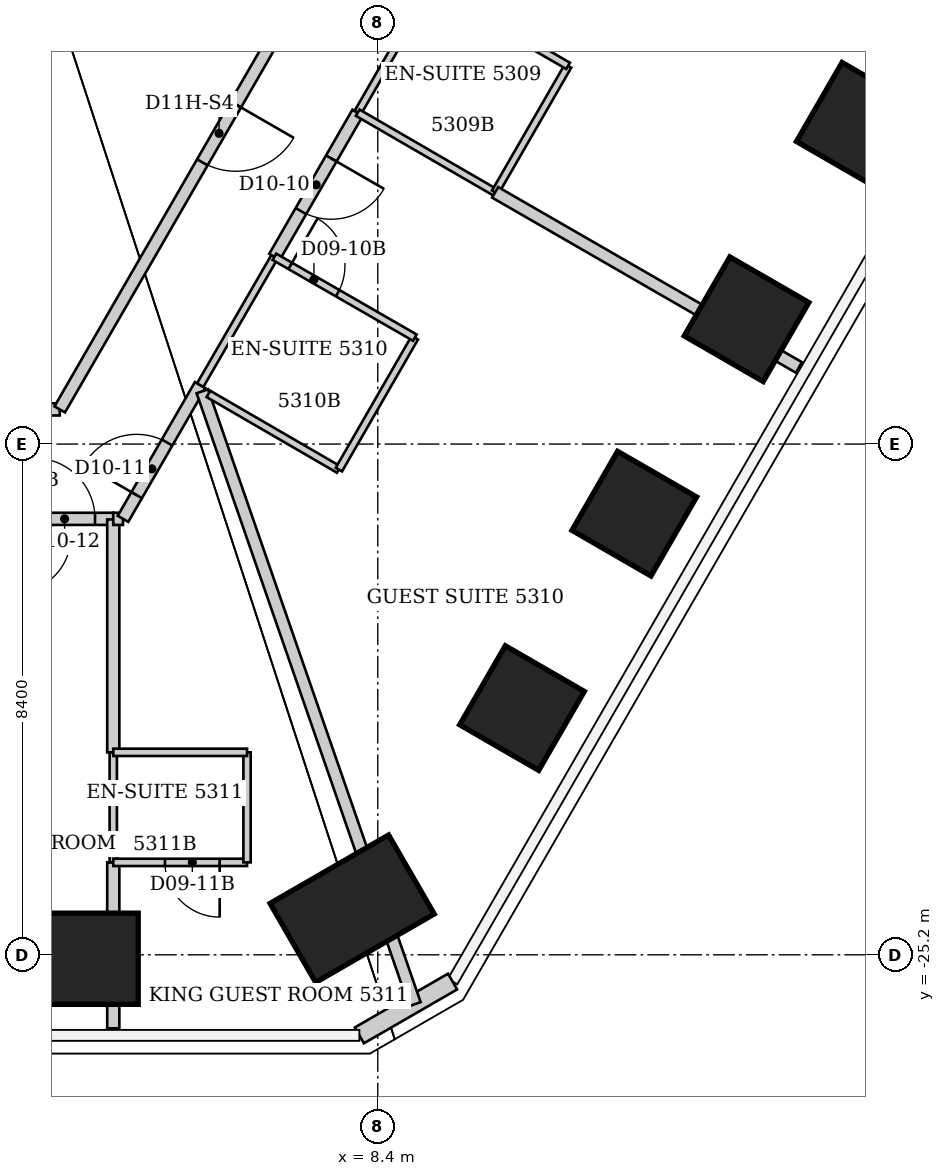
"""IFC4 building model, lengths in metres.
Left out: names, types, materials, properties, quantities, classifications, styles, units other than length and angle.
Written with IfcOpenShell. Run it as: python <this file> out.ifc"""

import sys

from ifc_helpers import new_model, si_unit, direction, frame, frame_2d, origin, origin_2d, place, context, subcontext, project, spatial, rectangle, extrude, element, fill, save


model = new_model("IFC4")
c1 = context("Model", 3, precision=1e-05, world=origin(), true_north=direction((0.0, 1.0)))
c2 = subcontext(c1, "Body", "Model", "MODEL_VIEW")
j1 = project(units=[si_unit("LENGTHUNIT", "METRE"), si_unit("PLANEANGLEUNIT", "RADIAN")], contexts=[c1])
p1 = place(None, origin())
s1 = spatial("IfcSite", under=j1, at=p1, CompositionType="ELEMENT")
p2 = place(p1, origin())
s2 = spatial("IfcBuilding", under=s1, at=p2, CompositionType="ELEMENT")
p3 = place(p2, frame((0.0, 0.0, 213.6)))
s3 = spatial("IfcBuildingStorey", under=s2, at=p3, CompositionType="ELEMENT", Elevation=213.6)
for number, where, z_axis, x_axis in (
    (1, (16.311, -11.549, 0.0), (0.0, 0.0, 1.0), (0.866, -0.5, 0.0)),
    (2, (14.465, -14.747, 0.0), (0.0, 0.0, 1.0), (0.866, -0.5, 0.0)),
    (3, (12.618, -17.945, 0.0), (0.0, 0.0, 1.0), (0.866, -0.5, 0.0)),
    (4, (10.772, -21.142, 0.0), (0.0, 0.0, 1.0), (0.866, -0.5, 0.0)),
):
    element("IfcColumn", number, at=place(p3, frame(where, z_axis=z_axis, x_axis=x_axis)), inside=s3, PredefinedType="COLUMN", context=c2, shape_type="SweptSolid", body=[
        extrude(rectangle(XDim=1.5, YDim=1.5, at=origin_2d()), origin(), (0.0, 0.0, 1.0), 3.8),
    ])
p4 = place(p3, frame((7.979, -24.442, 0.0), z_axis=(0.0, 0.0, 1.0), x_axis=(0.5, -0.866025403784, 0.0)))
e5 = element("IfcColumn", 5, at=p4, inside=s3, PredefinedType="COLUMN", context=c2, shape_type="SweptSolid", body=[
    extrude(rectangle(XDim=1.5, YDim=2.25, at=origin_2d()), origin(), (0.0, 0.0, 1.0), 3.8),
])
p5 = place(p3, frame((3.71, -25.265, 0.0), z_axis=(0.0, 0.0, 1.0), x_axis=(0.0, -1.0, 0.0)))
e6 = element("IfcColumn", 6, at=p5, inside=s3, PredefinedType="COLUMN", context=c2, shape_type="SweptSolid", body=[
    extrude(rectangle(XDim=1.5, YDim=1.5, at=origin_2d()), origin(), (0.0, 0.0, 1.0), 3.8),
])
p6 = place(p3, frame((9.63, -25.64, 0.0), z_axis=(0.0, 0.0, 1.0), x_axis=(-0.866036293601, -0.499981137809, 0.0)))
e7 = element("IfcWall", 7, at=p6, inside=s3, PredefinedType="SOLIDWALL", context=c2, shape_type="SweptSolid", body=[
    extrude(rectangle(XDim=1.77, YDim=0.3, at=frame_2d((0.885, 0.0))), origin(), (0.0, 0.0, 1.0), 3.64),
])
p7 = place(p3, frame((2.45, -18.03, 0.0), z_axis=(0.0, 0.0, 1.0), x_axis=(1.0, 0.0, 0.0)))
e8 = element("IfcWall", 8, at=p7, inside=s3, PredefinedType="PARTITIONING", context=c2, shape_type="SweptSolid", body=[
    extrude(rectangle(XDim=1.6, YDim=0.2, at=frame_2d((0.8, 0.0))), origin(), (0.0, 0.0, 1.0), 3.64),
])
p8 = place(p7, frame((0.3, 0.0, 0.0)))
e9 = element("IfcOpeningElement", 9, at=p8, cuts=e8, PredefinedType="OPENING", context=c2, shape_type="SweptSolid", body=[
    extrude(rectangle(XDim=1.0, YDim=2.13, at=frame_2d((0.5, 1.065))), frame((0.0, 0.1, 0.0), z_axis=(0.0, -1.0, 0.0), x_axis=(1.0, 0.0, 0.0)), (0.0, 0.0, 1.0), 0.2),
])
p9 = place(p3, frame((3.17, -16.23, 0.0), z_axis=(0.0, 0.0, 1.0), x_axis=(-1.0, 0.0, 0.0)))
e10 = element("IfcWall", 10, at=p9, inside=s3, PredefinedType="PARTITIONING", context=c2, shape_type="SweptSolid", body=[
    extrude(rectangle(XDim=1.57, YDim=0.2, at=frame_2d((0.785, 0.0))), origin(), (0.0, 0.0, 1.0), 3.64),
])
p10 = place(p3, frame((4.05, -26.41, 0.0), z_axis=(0.0, 0.0, 1.0), x_axis=(0.0, 1.0, 0.0)))
e11 = element("IfcWall", 11, at=p10, inside=s3, PredefinedType="PARTITIONING", context=c2, shape_type="SweptSolid", body=[
    extrude(rectangle(XDim=2.73, YDim=0.2, at=frame_2d((1.365, 0.0))), origin(), (0.0, 0.0, 1.0), 3.64),
])
p11 = place(p3, frame((4.05, -23.68, 0.0), z_axis=(0.0, 0.0, 1.0), x_axis=(0.0, 1.0, 0.0)))
e12 = element("IfcWall", 12, at=p11, inside=s3, PredefinedType="PARTITIONING", context=c2, shape_type="SweptSolid", body=[
    extrude(rectangle(XDim=1.81, YDim=0.12, at=frame_2d((0.905, 0.0))), origin(), (0.0, 0.0, 1.0), 3.64),
])
p12 = place(p3, frame((4.05, -23.68, 0.0), z_axis=(0.0, 0.0, 1.0), x_axis=(1.0, 0.0, 0.0)))
e13 = element("IfcWall", 13, at=p12, inside=s3, PredefinedType="PARTITIONING", context=c2, shape_type="SweptSolid", body=[
    extrude(rectangle(XDim=2.2, YDim=0.12, at=frame_2d((1.1, 0.0))), origin(), (0.0, 0.0, 1.0), 3.64),
])
p13 = place(p12, frame((0.85, 0.0, 0.0)))
e14 = element("IfcOpeningElement", 14, at=p13, cuts=e13, PredefinedType="OPENING", context=c2, shape_type="SweptSolid", body=[
    extrude(rectangle(XDim=0.9, YDim=2.03, at=frame_2d((0.45, 1.015))), frame((0.0, 0.06, 0.0), z_axis=(0.0, -1.0, 0.0), x_axis=(1.0, 0.0, 0.0)), (0.0, 0.0, 1.0), 0.12),
])
p14 = place(p3, frame((4.05, -21.87, 0.0), z_axis=(0.0, 0.0, 1.0), x_axis=(0.0, 1.0, 0.0)))
e15 = element("IfcWall", 15, at=p14, inside=s3, PredefinedType="PARTITIONING", context=c2, shape_type="SweptSolid", body=[
    extrude(rectangle(XDim=3.83, YDim=0.2, at=frame_2d((1.915, 0.0))), origin(), (0.0, 0.0, 1.0), 3.64),
])
p15 = place(p3, frame((4.05, -18.03, 0.0), z_axis=(0.0, 0.0, 1.0), x_axis=(1.0, 0.0, 0.0)))
e16 = element("IfcWall", 16, at=p15, inside=s3, PredefinedType="PARTITIONING", context=c2, shape_type="SweptSolid", body=[
    extrude(rectangle(XDim=0.16, YDim=0.2, at=frame_2d((0.08, 0.0))), origin(), (0.0, 0.0, 1.0), 3.64),
])
p16 = place(p3, frame((4.21, -18.03, 0.0), z_axis=(0.0, 0.0, 1.0), x_axis=(0.499963722229, 0.866046347752, 0.0)))
e17 = element("IfcWall", 17, at=p16, inside=s3, PredefinedType="PARTITIONING", context=c2, shape_type="SweptSolid", body=[
    extrude(rectangle(XDim=2.54, YDim=0.2, at=frame_2d((1.27, 0.0))), origin(), (0.0, 0.0, 1.0), 3.64),
])
p17 = place(p16, frame((0.45, 0.0, 0.0)))
e18 = element("IfcOpeningElement", 18, at=p17, cuts=e17, PredefinedType="OPENING", context=c2, shape_type="SweptSolid", body=[
    extrude(rectangle(XDim=1.0, YDim=2.13, at=frame_2d((0.5, 1.065))), frame((0.0, 0.1, 0.0), z_axis=(0.0, -1.0, 0.0), x_axis=(1.0, 0.0, 0.0)), (0.0, 0.0, 1.0), 0.2),
])
p18 = place(p3, frame((5.48, -15.83, 0.0), z_axis=(0.0, 0.0, 1.0), x_axis=(0.50122183301, 0.865318828013, 0.0)))
e19 = element("IfcWall", 19, at=p18, inside=s3, PredefinedType="PARTITIONING", context=c2, shape_type="SweptSolid", body=[
    extrude(rectangle(XDim=2.438, YDim=0.12, at=frame_2d((1.219, 0.0))), origin(), (0.0, 0.0, 1.0), 3.64),
])
p19 = place(p3, frame((5.515, -15.932, 0.0), z_axis=(0.0, 0.0, 1.0), x_axis=(0.327594697431, -0.944818349851, 0.0)))
e20 = element("IfcWall", 20, at=p19, inside=s3, PredefinedType="PARTITIONING", context=c2, shape_type="SweptSolid", body=[
    extrude(rectangle(XDim=10.668, YDim=0.2, at=frame_2d((5.334, 0.0))), origin(), (0.0, 0.0, 1.0), 3.64),
])
p20 = place(p3, frame((5.615, -15.975, 0.0), z_axis=(0.0, 0.0, 1.0), x_axis=(0.864873056518, -0.501990633487, 0.0)))
e21 = element("IfcWall", 21, at=p20, inside=s3, PredefinedType="PARTITIONING", context=c2, shape_type="SweptSolid", body=[
    extrude(rectangle(XDim=2.48, YDim=0.12, at=frame_2d((1.24, 0.0))), origin(), (0.0, 0.0, 1.0), 3.038),
])
p21 = place(p3, frame((6.25, -23.68, 0.0), z_axis=(0.0, 0.0, 1.0), x_axis=(0.0, 1.0, 0.0)))
e22 = element("IfcWall", 22, at=p21, inside=s3, PredefinedType="PARTITIONING", context=c2, shape_type="SweptSolid", body=[
    extrude(rectangle(XDim=1.81, YDim=0.12, at=frame_2d((0.905, 0.0))), origin(), (0.0, 0.0, 1.0), 3.64),
])
p22 = place(p3, frame((6.25, -21.87, 0.0), z_axis=(0.0, 0.0, 1.0), x_axis=(-1.0, 0.0, 0.0)))
e23 = element("IfcWall", 23, at=p22, inside=s3, PredefinedType="PARTITIONING", context=c2, shape_type="SweptSolid", body=[
    extrude(rectangle(XDim=2.2, YDim=0.12, at=frame_2d((1.1, 0.0))), origin(), (0.0, 0.0, 1.0), 3.64),
])
p23 = place(p3, frame((7.76, -17.22, 0.0), z_axis=(0.0, 0.0, 1.0), x_axis=(0.499159685399, 0.866510016372, 0.0)))
e24 = element("IfcWall", 24, at=p23, inside=s3, PredefinedType="PARTITIONING", context=c2, shape_type="SweptSolid", body=[
    extrude(rectangle(XDim=2.504, YDim=0.12, at=frame_2d((1.252, 0.0))), origin(), (0.0, 0.0, 1.0), 3.64),
])
p24 = place(p3, frame((8.07, -11.35, 0.0), z_axis=(0.0, 0.0, 1.0), x_axis=(-0.499889730522, -0.866089058537, 0.0)))
e25 = element("IfcWall", 25, at=p24, inside=s3, PredefinedType="PARTITIONING", context=c2, shape_type="SweptSolid", body=[
    extrude(rectangle(XDim=2.737, YDim=0.2, at=frame_2d((1.369, 0.0))), origin(), (0.0, 0.0, 1.0), 3.64),
])
p25 = place(p24, frame((0.869, 0.0, 0.0)))
e26 = element("IfcOpeningElement", 26, at=p25, cuts=e25, PredefinedType="OPENING", context=c2, shape_type="SweptSolid", body=[
    extrude(rectangle(XDim=1.0, YDim=2.13, at=frame_2d((0.5, 1.065))), frame((0.0, 0.1, 0.0), z_axis=(0.0, -1.0, 0.0), x_axis=(1.0, 0.0, 0.0)), (0.0, 0.0, 1.0), 0.2),
])
p26 = place(p3, frame((8.07, -11.35, 0.0), z_axis=(0.0, 0.0, 1.0), x_axis=(0.499693115345, 0.866202511239, 0.0)))
e27 = element("IfcWall", 27, at=p26, inside=s3, PredefinedType="PARTITIONING", context=c2, shape_type="SweptSolid", body=[
    extrude(rectangle(XDim=2.401, YDim=0.12, at=frame_2d((1.201, 0.0))), origin(), (0.0, 0.0, 1.0), 3.64),
])
p27 = place(p3, frame((8.07, -11.35, 0.0), z_axis=(0.0, 0.0, 1.0), x_axis=(0.865195830568, -0.501434118073, 0.0)))
e28 = element("IfcWall", 28, at=p27, inside=s3, PredefinedType="PARTITIONING", context=c2, shape_type="SweptSolid", body=[
    extrude(rectangle(XDim=2.612, YDim=0.12, at=frame_2d((1.306, 0.0))), origin(), (0.0, 0.0, 1.0), 3.64),
])
p28 = place(p3, frame((8.41, -7.15, 0.0), z_axis=(0.0, 0.0, 1.0), x_axis=(-0.499828628176, -0.866124322748, 0.0)))
e29 = element("IfcWall", 29, at=p28, inside=s3, PredefinedType="PARTITIONING", context=c2, shape_type="SweptSolid", body=[
    extrude(rectangle(XDim=10.484, YDim=0.2, at=frame_2d((5.242, 0.0))), origin(), (0.0, 0.0, 1.0), 3.64),
])
p29 = place(p28, frame((4.692, 0.0, 0.0)))
e30 = element("IfcOpeningElement", 30, at=p29, cuts=e29, PredefinedType="OPENING", context=c2, shape_type="SweptSolid", body=[
    extrude(rectangle(XDim=1.1, YDim=2.2, at=frame_2d((0.55, 1.1))), frame((0.0, 0.1, 0.0), z_axis=(0.0, -1.0, 0.0), x_axis=(1.0, 0.0, 0.0)), (0.0, 0.0, 1.0), 0.2),
])
p30 = place(p3, frame((9.01, -15.05, 0.0), z_axis=(0.0, 0.0, 1.0), x_axis=(-0.866615255992, 0.498976951453, 0.0)))
e31 = element("IfcWall", 31, at=p30, inside=s3, PredefinedType="PARTITIONING", context=c2, shape_type="SweptSolid", body=[
    extrude(rectangle(XDim=2.666, YDim=0.12, at=frame_2d((1.333, 0.0))), origin(), (0.0, 0.0, 1.0), 3.64),
])
p31 = place(p30, frame((1.466, 0.0, 0.0)))
e32 = element("IfcOpeningElement", 32, at=p31, cuts=e31, PredefinedType="OPENING", context=c2, shape_type="SweptSolid", body=[
    extrude(rectangle(XDim=0.9, YDim=2.03, at=frame_2d((0.45, 1.015))), frame((0.0, 0.06, 0.0), z_axis=(0.0, -1.0, 0.0), x_axis=(1.0, 0.0, 0.0)), (0.0, 0.0, 1.0), 0.12),
])
p32 = place(p3, frame((10.33, -12.66, 0.0), z_axis=(0.0, 0.0, 1.0), x_axis=(0.499737123639, 0.866177122335, 0.0)))
e33 = element("IfcWall", 33, at=p32, inside=s3, PredefinedType="PARTITIONING", context=c2, shape_type="SweptSolid", body=[
    extrude(rectangle(XDim=2.401, YDim=0.12, at=frame_2d((1.201, 0.0))), origin(), (0.0, 0.0, 1.0), 3.64),
])
p33 = place(p3, frame((10.33, -12.66, 0.0), z_axis=(0.0, 0.0, 1.0), x_axis=(0.866342721203, -0.499449986905, 0.0)))
e34 = element("IfcWall", 34, at=p33, inside=s3, PredefinedType="PARTITIONING", context=c2, shape_type="SweptSolid", body=[
    extrude(rectangle(XDim=5.767, YDim=0.2, at=frame_2d((2.883, 0.0))), origin(), (0.0, 0.0, 1.0), 3.64),
])
p34 = place(p3, frame((11.53, -10.58, 0.0), z_axis=(0.0, 0.0, 1.0), x_axis=(-0.865155281359, 0.50150407689, 0.0)))
e35 = element("IfcWall", 35, at=p34, inside=s3, PredefinedType="PARTITIONING", context=c2, shape_type="SweptSolid", body=[
    extrude(rectangle(XDim=2.612, YDim=0.12, at=frame_2d((1.306, 0.0))), origin(), (0.0, 0.0, 1.0), 3.64),
])
p35 = place(p34, frame((1.412, 0.0, 0.0)))
e36 = element("IfcOpeningElement", 36, at=p35, cuts=e35, PredefinedType="OPENING", context=c2, shape_type="SweptSolid", body=[
    extrude(rectangle(XDim=0.9, YDim=2.03, at=frame_2d((0.45, 1.015))), frame((0.0, 0.06, 0.0), z_axis=(0.0, -1.0, 0.0), x_axis=(1.0, 0.0, 0.0)), (0.0, 0.0, 1.0), 0.12),
])
p36 = place(p25, origin())
e37 = element("IfcDoor", 37, at=p36, inside=s3, OperationType="SINGLE_SWING_LEFT", PredefinedType="DOOR", context=c2, shape_type="SweptSolid", body=[
    extrude(rectangle(XDim=1.0, YDim=2.13, at=frame_2d((0.5, 1.065))), frame((0.0, 0.025, 0.0), z_axis=(0.0, -1.0, 0.0), x_axis=(1.0, 0.0, 0.0)), (0.0, 0.0, 1.0), 0.05),
])
fill(e26, e37)
p37 = place(p31, origin())
e38 = element("IfcDoor", 38, at=p37, inside=s3, OperationType="SINGLE_SWING_RIGHT", PredefinedType="DOOR", context=c2, shape_type="SweptSolid", body=[
    extrude(rectangle(XDim=0.9, YDim=2.03, at=frame_2d((0.45, 1.015))), frame((0.0, 0.025, 0.0), z_axis=(0.0, -1.0, 0.0), x_axis=(1.0, 0.0, 0.0)), (0.0, 0.0, 1.0), 0.05),
])
fill(e32, e38)
p38 = place(p17, origin())
e39 = element("IfcDoor", 39, at=p38, inside=s3, OperationType="SINGLE_SWING_LEFT", PredefinedType="DOOR", context=c2, shape_type="SweptSolid", body=[
    extrude(rectangle(XDim=1.0, YDim=2.13, at=frame_2d((0.5, 1.065))), frame((0.0, 0.025, 0.0), z_axis=(0.0, -1.0, 0.0), x_axis=(1.0, 0.0, 0.0)), (0.0, 0.0, 1.0), 0.05),
])
fill(e18, e39)
p39 = place(p13, origin())
e40 = element("IfcDoor", 40, at=p39, inside=s3, OperationType="SINGLE_SWING_RIGHT", PredefinedType="DOOR", context=c2, shape_type="SweptSolid", body=[
    extrude(rectangle(XDim=0.9, YDim=2.03, at=frame_2d((0.45, 1.015))), frame((0.0, 0.025, 0.0), z_axis=(0.0, -1.0, 0.0), x_axis=(1.0, 0.0, 0.0)), (0.0, 0.0, 1.0), 0.05),
])
fill(e14, e40)
p40 = place(p8, origin())
e41 = element("IfcDoor", 41, at=p40, inside=s3, OperationType="SINGLE_SWING_LEFT", PredefinedType="DOOR", context=c2, shape_type="SweptSolid", body=[
    extrude(rectangle(XDim=1.0, YDim=2.13, at=frame_2d((0.5, 1.065))), frame((0.0, 0.025, 0.0), z_axis=(0.0, -1.0, 0.0), x_axis=(1.0, 0.0, 0.0)), (0.0, 0.0, 1.0), 0.05),
])
fill(e9, e41)
p41 = place(p29, origin())
e42 = element("IfcDoor", 42, at=p41, inside=s3, OperationType="SINGLE_SWING_LEFT", PredefinedType="DOOR", context=c2, shape_type="SweptSolid", body=[
    extrude(rectangle(XDim=1.1, YDim=2.2, at=frame_2d((0.55, 1.1))), frame((0.0, 0.025, 0.0), z_axis=(0.0, -1.0, 0.0), x_axis=(1.0, 0.0, 0.0)), (0.0, 0.0, 1.0), 0.05),
])
fill(e30, e42)
save(model, sys.argv[1])
